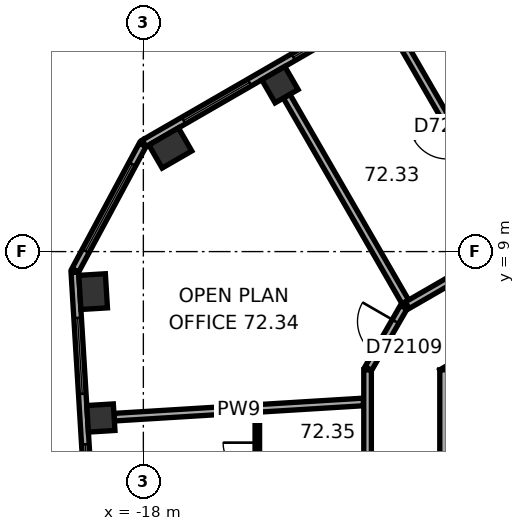
"""IFC4 building model, lengths in metres.
Left out: names, types, materials, properties, quantities, classifications, styles, units other than length and angle.
Written with IfcOpenShell. Run it as: python <this file> out.ifc"""

import sys

from ifc_helpers import new_model, si_unit, direction, frame, frame_2d, origin, origin_2d, place, context, subcontext, project, spatial, rectangle, extrude, element, fill, save


model = new_model("IFC4")
c1 = context("Model", 3, precision=1e-05, world=origin(), true_north=direction((0.0, 1.0)))
c2 = subcontext(c1, "Body", "Model", "MODEL_VIEW")
j1 = project(units=[si_unit("LENGTHUNIT", "METRE"), si_unit("PLANEANGLEUNIT", "RADIAN")], contexts=[c1])
p1 = place(None, origin())
s1 = spatial("IfcSite", under=j1, at=p1, CompositionType="ELEMENT")
p2 = place(p1, origin())
s2 = spatial("IfcBuilding", under=s1, at=p2, CompositionType="ELEMENT")
p3 = place(p2, frame((0.0, 0.0, 293.1)))
s3 = spatial("IfcBuildingStorey", under=s2, at=p3, CompositionType="ELEMENT", Elevation=293.1)
p4 = place(p3, frame((-14.406, 13.391, 0.0), z_axis=(0.0, 0.0, 1.0), x_axis=(-0.866025403784, -0.5, 0.0)))
e1 = element("IfcColumn", 1, at=p4, inside=s3, PredefinedType="COLUMN", context=c2, shape_type="SweptSolid", body=[
    extrude(rectangle(XDim=0.7, YDim=0.7, at=origin_2d()), origin(), (0.0, 0.0, 1.0), 3.7),
])
for number, where, z_axis, x_axis in (
    (2, (-17.291, 11.726, 0.0), (0.0, 0.0, 1.0), (-0.866, -0.5, 0.0)),
    (3, (-19.321, 7.947, 0.0), (0.0, 0.0, 1.0), (0.061, -0.998, 0.0)),
):
    element("IfcColumn", number, at=place(p3, frame(where, z_axis=z_axis, x_axis=x_axis)), inside=s3, PredefinedType="COLUMN", context=c2, shape_type="SweptSolid", body=[
        extrude(rectangle(XDim=0.9, YDim=0.7, at=origin_2d()), origin(), (0.0, 0.0, 1.0), 3.7),
    ])
p5 = place(p3, frame((-19.118, 4.621, 0.0), z_axis=(0.0, 0.0, 1.0), x_axis=(0.061048539535, -0.998134798422, 0.0)))
e4 = element("IfcColumn", 4, at=p5, inside=s3, PredefinedType="COLUMN", context=c2, shape_type="SweptSolid", body=[
    extrude(rectangle(XDim=0.7, YDim=0.7, at=origin_2d()), origin(), (0.0, 0.0, 1.0), 3.7),
])
p6 = place(p3, frame((0.175, 11.475, 0.0), z_axis=(0.0, 0.0, 1.0), x_axis=(-0.866026453023, -0.499998182661, 0.0)))
e5 = element("IfcWall", 5, at=p6, inside=s3, PredefinedType="SHEAR", context=c2, shape_type="SweptSolid", body=[
    extrude(rectangle(XDim=11.778, YDim=0.7, at=frame_2d((5.889, 0.0))), origin(), (0.0, 0.0, 1.0), 3.7),
])
p7 = place(p6, frame((6.089, 0.0, 0.0)))
e6 = element("IfcOpeningElement", 6, at=p7, cuts=e5, PredefinedType="OPENING", context=c2, shape_type="SweptSolid", body=[
    extrude(rectangle(XDim=1.5, YDim=2.1, at=frame_2d((0.75, 1.05))), frame((0.0, 0.36, 0.0), z_axis=(0.0, -1.0, 0.0), x_axis=(1.0, 0.0, 0.0)), (0.0, 0.0, 1.0), 0.72),
])
p8 = place(p6, frame((2.939, 0.0, 0.0)))
e7 = element("IfcOpeningElement", 7, at=p8, cuts=e5, PredefinedType="OPENING", context=c2, shape_type="SweptSolid", body=[
    extrude(rectangle(XDim=0.9, YDim=2.1, at=frame_2d((0.45, 1.05))), frame((0.0, 0.36, 0.0), z_axis=(0.0, -1.0, 0.0), x_axis=(1.0, 0.0, 0.0)), (0.0, 0.0, 1.0), 0.72),
])
p9 = place(p3, frame((-9.85, 5.889, 0.0), z_axis=(0.0, 0.0, 1.0), x_axis=(0.0, -1.0, 0.0)))
e8 = element("IfcWall", 8, at=p9, inside=s3, PredefinedType="SHEAR", context=c2, shape_type="SweptSolid", body=[
    extrude(rectangle(XDim=11.778, YDim=0.7, at=frame_2d((5.889, 0.0))), origin(), (0.0, 0.0, 1.0), 3.7),
])
p10 = place(p9, frame((5.039, 0.0, 0.0)))
e9 = element("IfcOpeningElement", 9, at=p10, cuts=e8, PredefinedType="OPENING", context=c2, shape_type="SweptSolid", body=[
    extrude(rectangle(XDim=1.1, YDim=2.1, at=frame_2d((0.55, 1.05))), frame((0.0, 0.36, 0.0), z_axis=(0.0, -1.0, 0.0), x_axis=(1.0, 0.0, 0.0)), (0.0, 0.0, 1.0), 0.72),
])
p11 = place(p9, frame((7.639, 0.0, 0.0)))
e10 = element("IfcOpeningElement", 10, at=p11, cuts=e8, PredefinedType="OPENING", context=c2, shape_type="SweptSolid", body=[
    extrude(rectangle(XDim=1.1, YDim=2.1, at=frame_2d((0.55, 1.05))), frame((0.0, 0.36, 0.0), z_axis=(0.0, -1.0, 0.0), x_axis=(1.0, 0.0, 0.0)), (0.0, 0.0, 1.0), 0.72),
])
p12 = place(p3, frame((-2.624, 20.713, 0.0), z_axis=(0.0, 0.0, 1.0), x_axis=(-0.866026460444, -0.499998169808, 0.0)))
e11 = element("IfcWall", 11, at=p12, inside=s3, PredefinedType="STANDARD", context=c2, shape_type="SweptSolid", body=[
    extrude(rectangle(XDim=17.731, YDim=0.2, at=frame_2d((8.866, 0.0))), origin(), (0.0, 0.0, 1.0), 3.7),
])
p13 = place(p12, frame((1.203, 0.0, 0.9)))
e12 = element("IfcOpeningElement", 12, at=p13, cuts=e11, PredefinedType="OPENING", context=c2, shape_type="SweptSolid", body=[
    extrude(rectangle(XDim=2.0, YDim=2.0, at=frame_2d((1.0, 1.0))), frame((0.0, 0.11, 0.0), z_axis=(0.0, -1.0, 0.0), x_axis=(1.0, 0.0, 0.0)), (0.0, 0.0, 1.0), 0.22),
])
p14 = place(p12, frame((4.535, 0.0, 0.9)))
e13 = element("IfcOpeningElement", 13, at=p14, cuts=e11, PredefinedType="OPENING", context=c2, shape_type="SweptSolid", body=[
    extrude(rectangle(XDim=2.0, YDim=2.0, at=frame_2d((1.0, 1.0))), frame((0.0, 0.11, 0.0), z_axis=(0.0, -1.0, 0.0), x_axis=(1.0, 0.0, 0.0)), (0.0, 0.0, 1.0), 0.22),
])
p15 = place(p12, frame((7.867, 0.0, 0.9)))
e14 = element("IfcOpeningElement", 14, at=p15, cuts=e11, PredefinedType="OPENING", context=c2, shape_type="SweptSolid", body=[
    extrude(rectangle(XDim=2.0, YDim=2.0, at=frame_2d((1.0, 1.0))), frame((0.0, 0.11, 0.0), z_axis=(0.0, -1.0, 0.0), x_axis=(1.0, 0.0, 0.0)), (0.0, 0.0, 1.0), 0.22),
])
p16 = place(p12, frame((11.198, 0.0, 0.9)))
e15 = element("IfcOpeningElement", 15, at=p16, cuts=e11, PredefinedType="OPENING", context=c2, shape_type="SweptSolid", body=[
    extrude(rectangle(XDim=2.0, YDim=2.0, at=frame_2d((1.0, 1.0))), frame((0.0, 0.11, 0.0), z_axis=(0.0, -1.0, 0.0), x_axis=(1.0, 0.0, 0.0)), (0.0, 0.0, 1.0), 0.22),
])
p17 = place(p12, frame((14.53, 0.0, 0.9)))
e16 = element("IfcOpeningElement", 16, at=p17, cuts=e11, PredefinedType="OPENING", context=c2, shape_type="SweptSolid", body=[
    extrude(rectangle(XDim=2.0, YDim=2.0, at=frame_2d((1.0, 1.0))), frame((0.0, 0.11, 0.0), z_axis=(0.0, -1.0, 0.0), x_axis=(1.0, 0.0, 0.0)), (0.0, 0.0, 1.0), 0.22),
])
p18 = place(p3, frame((-18.018, 11.808, 0.0), z_axis=(0.0, 0.0, 1.0), x_axis=(-0.473318619185, -0.880891301315, 0.0)))
e17 = element("IfcWall", 17, at=p18, inside=s3, PredefinedType="STANDARD", context=c2, shape_type="SweptSolid", body=[
    extrude(rectangle(XDim=3.747, YDim=0.2, at=frame_2d((1.874, 0.0))), origin(), (0.0, 0.0, 1.0), 3.7),
])
p19 = place(p18, frame((0.573, 0.0, 0.9)))
e18 = element("IfcOpeningElement", 18, at=p19, cuts=e17, PredefinedType="OPENING", context=c2, shape_type="SweptSolid", body=[
    extrude(rectangle(XDim=2.6, YDim=2.0, at=frame_2d((1.3, 1.0))), frame((0.0, 0.11, 0.0), z_axis=(0.0, -1.0, 0.0), x_axis=(1.0, 0.0, 0.0)), (0.0, 0.0, 1.0), 0.22),
])
p20 = place(p3, frame((-19.803, 8.454, 0.0), z_axis=(0.0, 0.0, 1.0), x_axis=(0.061036717565, -0.998135521414, 0.0)))
e19 = element("IfcWall", 19, at=p20, inside=s3, PredefinedType="STANDARD", context=c2, shape_type="SweptSolid", body=[
    extrude(rectangle(XDim=17.731, YDim=0.2, at=frame_2d((8.866, 0.0))), origin(), (0.0, 0.0, 1.0), 3.7),
])
p21 = place(p20, frame((1.202, 0.0, 0.9)))
e20 = element("IfcOpeningElement", 20, at=p21, cuts=e19, PredefinedType="OPENING", context=c2, shape_type="SweptSolid", body=[
    extrude(rectangle(XDim=2.0, YDim=2.0, at=frame_2d((1.0, 1.0))), frame((0.0, 0.11, 0.0), z_axis=(0.0, -1.0, 0.0), x_axis=(1.0, 0.0, 0.0)), (0.0, 0.0, 1.0), 0.22),
])
p22 = place(p20, frame((4.533, 0.0, 0.9)))
e21 = element("IfcOpeningElement", 21, at=p22, cuts=e19, PredefinedType="OPENING", context=c2, shape_type="SweptSolid", body=[
    extrude(rectangle(XDim=2.0, YDim=2.0, at=frame_2d((1.0, 1.0))), frame((0.0, 0.11, 0.0), z_axis=(0.0, -1.0, 0.0), x_axis=(1.0, 0.0, 0.0)), (0.0, 0.0, 1.0), 0.22),
])
p23 = place(p20, frame((7.865, 0.0, 0.9)))
e22 = element("IfcOpeningElement", 22, at=p23, cuts=e19, PredefinedType="OPENING", context=c2, shape_type="SweptSolid", body=[
    extrude(rectangle(XDim=2.0, YDim=2.0, at=frame_2d((1.0, 1.0))), frame((0.0, 0.11, 0.0), z_axis=(0.0, -1.0, 0.0), x_axis=(1.0, 0.0, 0.0)), (0.0, 0.0, 1.0), 0.22),
])
p24 = place(p20, frame((11.197, 0.0, 0.9)))
e23 = element("IfcOpeningElement", 23, at=p24, cuts=e19, PredefinedType="OPENING", context=c2, shape_type="SweptSolid", body=[
    extrude(rectangle(XDim=2.0, YDim=2.0, at=frame_2d((1.0, 1.0))), frame((0.0, 0.11, 0.0), z_axis=(0.0, -1.0, 0.0), x_axis=(1.0, 0.0, 0.0)), (0.0, 0.0, 1.0), 0.22),
])
p25 = place(p20, frame((14.528, 0.0, 0.9)))
e24 = element("IfcOpeningElement", 24, at=p25, cuts=e19, PredefinedType="OPENING", context=c2, shape_type="SweptSolid", body=[
    extrude(rectangle(XDim=2.0, YDim=2.0, at=frame_2d((1.0, 1.0))), frame((0.0, 0.11, 0.0), z_axis=(0.0, -1.0, 0.0), x_axis=(1.0, 0.0, 0.0)), (0.0, 0.0, 1.0), 0.22),
])
p26 = place(p3, frame((-18.768, 4.643, 0.0), z_axis=(0.0, 0.0, 1.0), x_axis=(0.99813496285, 0.0610458511, 0.0)))
e25 = element("IfcWall", 25, at=p26, inside=s3, PredefinedType="PARTITIONING", context=c2, shape_type="SweptSolid", body=[
    extrude(rectangle(XDim=6.571, YDim=0.2, at=frame_2d((3.285, 0.0))), origin(), (0.0, 0.0, 1.0), 3.42),
])
p27 = place(p3, frame((-15.001, 4.773, 0.0), z_axis=(0.0, 0.0, 1.0), x_axis=(0.0, -1.0, 0.0)))
e26 = element("IfcWall", 26, at=p27, inside=s3, PredefinedType="PARTITIONING", context=c2, shape_type="SweptSolid", body=[
    extrude(rectangle(XDim=6.476, YDim=0.12, at=frame_2d((3.238, 0.0))), origin(), (0.0, 0.0, 1.0), 3.42),
])
p28 = place(p27, frame((5.011, 0.0, 0.0)))
e27 = element("IfcOpeningElement", 27, at=p28, cuts=e26, PredefinedType="OPENING", context=c2, shape_type="SweptSolid", body=[
    extrude(rectangle(XDim=1.0, YDim=2.1, at=frame_2d((0.5, 1.05))), frame((0.0, 0.07, 0.0), z_axis=(0.0, -1.0, 0.0), x_axis=(1.0, 0.0, 0.0)), (0.0, 0.0, 1.0), 0.14),
])
p29 = place(p27, frame((0.8, 0.0, 0.0)))
e28 = element("IfcOpeningElement", 28, at=p29, cuts=e26, PredefinedType="OPENING", context=c2, shape_type="SweptSolid", body=[
    extrude(rectangle(XDim=0.9, YDim=2.1, at=frame_2d((0.45, 1.05))), frame((0.0, 0.07, 0.0), z_axis=(0.0, -1.0, 0.0), x_axis=(1.0, 0.0, 0.0)), (0.0, 0.0, 1.0), 0.14),
])
p30 = place(p27, frame((3.073, 0.0, 0.0)))
e29 = element("IfcOpeningElement", 29, at=p30, cuts=e26, PredefinedType="OPENING", context=c2, shape_type="SweptSolid", body=[
    extrude(rectangle(XDim=0.9, YDim=2.1, at=frame_2d((0.45, 1.05))), frame((0.0, 0.07, 0.0), z_axis=(0.0, -1.0, 0.0), x_axis=(1.0, 0.0, 0.0)), (0.0, 0.0, 1.0), 0.14),
])
p31 = place(p3, frame((-14.23, 13.088, 0.0), z_axis=(0.0, 0.0, 1.0), x_axis=(0.500004234368, -0.866022959057, 0.0)))
e30 = element("IfcWall", 30, at=p31, inside=s3, PredefinedType="PARTITIONING", context=c2, shape_type="SweptSolid", body=[
    extrude(rectangle(XDim=6.25, YDim=0.2, at=frame_2d((3.125, 0.0))), origin(), (0.0, 0.0, 1.0), 3.42),
])
p32 = place(p3, frame((-12.1, 5.889, 0.0), z_axis=(0.0, 0.0, 1.0), x_axis=(0.0, -1.0, 0.0)))
e31 = element("IfcWall", 31, at=p32, inside=s3, PredefinedType="PARTITIONING", context=c2, shape_type="SweptSolid", body=[
    extrude(rectangle(XDim=3.688, YDim=0.2, at=frame_2d((1.844, 0.0))), origin(), (0.0, 0.0, 1.0), 3.42),
])
p33 = place(p3, frame((-11.345, 14.754, 0.0), z_axis=(0.0, 0.0, 1.0), x_axis=(0.500005339912, -0.866022320763, 0.0)))
e32 = element("IfcWall", 32, at=p33, inside=s3, PredefinedType="PARTITIONING", context=c2, shape_type="SweptSolid", body=[
    extrude(rectangle(XDim=6.35, YDim=0.2, at=frame_2d((3.175, 0.0))), origin(), (0.0, 0.0, 1.0), 3.42),
])
p34 = place(p33, frame((2.675, 0.0, 0.0)))
e33 = element("IfcOpeningElement", 33, at=p34, cuts=e32, PredefinedType="OPENING", context=c2, shape_type="SweptSolid", body=[
    extrude(rectangle(XDim=1.0, YDim=2.1, at=frame_2d((0.5, 1.05))), frame((0.0, 0.11, 0.0), z_axis=(0.0, -1.0, 0.0), x_axis=(1.0, 0.0, 0.0)), (0.0, 0.0, 1.0), 0.22),
])
p35 = place(p3, frame((-11.15, 7.534, 0.0), z_axis=(0.0, 0.0, 1.0), x_axis=(-0.500063286585, -0.865988862174, 0.0)))
e34 = element("IfcWall", 34, at=p35, inside=s3, PredefinedType="PARTITIONING", context=c2, shape_type="SweptSolid", body=[
    extrude(rectangle(XDim=1.86, YDim=0.2, at=frame_2d((0.93, 0.0))), origin(), (0.0, 0.0, 1.0), 3.42),
])
p36 = place(p35, frame((0.43, 0.0, 0.0)))
e35 = element("IfcOpeningElement", 35, at=p36, cuts=e34, PredefinedType="OPENING", context=c2, shape_type="SweptSolid", body=[
    extrude(rectangle(XDim=1.0, YDim=2.1, at=frame_2d((0.5, 1.05))), frame((0.0, 0.11, 0.0), z_axis=(0.0, -1.0, 0.0), x_axis=(1.0, 0.0, 0.0)), (0.0, 0.0, 1.0), 0.22),
])
p37 = place(p3, frame((-8.257, 9.205, 0.0), z_axis=(0.0, 0.0, 1.0), x_axis=(-0.866030838723, -0.499990586292, 0.0)))
e36 = element("IfcWall", 36, at=p37, inside=s3, PredefinedType="PARTITIONING", context=c2, shape_type="SweptSolid", body=[
    extrude(rectangle(XDim=3.231, YDim=0.2, at=frame_2d((1.616, 0.0))), origin(), (0.0, 0.0, 1.0), 3.42),
])
p38 = place(p16, origin())
e37 = element("IfcWindow", 37, at=p38, inside=s3, PartitioningType="SINGLE_PANEL", PredefinedType="WINDOW", context=c2, shape_type="SweptSolid", body=[
    extrude(rectangle(XDim=2.0, YDim=2.0, at=frame_2d((1.0, 1.0))), frame((0.0, 0.03, 0.0), z_axis=(0.0, -1.0, 0.0), x_axis=(1.0, 0.0, 0.0)), (0.0, 0.0, 1.0), 0.06),
])
fill(e15, e37)
p39 = place(p17, origin())
e38 = element("IfcWindow", 38, at=p39, inside=s3, PartitioningType="SINGLE_PANEL", PredefinedType="WINDOW", context=c2, shape_type="SweptSolid", body=[
    extrude(rectangle(XDim=2.0, YDim=2.0, at=frame_2d((1.0, 1.0))), frame((0.0, 0.03, 0.0), z_axis=(0.0, -1.0, 0.0), x_axis=(1.0, 0.0, 0.0)), (0.0, 0.0, 1.0), 0.06),
])
fill(e16, e38)
p40 = place(p19, origin())
e39 = element("IfcWindow", 39, at=p40, inside=s3, PartitioningType="SINGLE_PANEL", PredefinedType="WINDOW", context=c2, shape_type="SweptSolid", body=[
    extrude(rectangle(XDim=2.6, YDim=2.0, at=frame_2d((1.3, 1.0))), frame((0.0, 0.03, 0.0), z_axis=(0.0, -1.0, 0.0), x_axis=(1.0, 0.0, 0.0)), (0.0, 0.0, 1.0), 0.06),
])
fill(e18, e39)
p41 = place(p21, origin())
e40 = element("IfcWindow", 40, at=p41, inside=s3, PartitioningType="SINGLE_PANEL", PredefinedType="WINDOW", context=c2, shape_type="SweptSolid", body=[
    extrude(rectangle(XDim=2.0, YDim=2.0, at=frame_2d((1.0, 1.0))), frame((0.0, 0.03, 0.0), z_axis=(0.0, -1.0, 0.0), x_axis=(1.0, 0.0, 0.0)), (0.0, 0.0, 1.0), 0.06),
])
fill(e20, e40)
p42 = place(p22, origin())
e41 = element("IfcWindow", 41, at=p42, inside=s3, PartitioningType="SINGLE_PANEL", PredefinedType="WINDOW", context=c2, shape_type="SweptSolid", body=[
    extrude(rectangle(XDim=2.0, YDim=2.0, at=frame_2d((1.0, 1.0))), frame((0.0, 0.03, 0.0), z_axis=(0.0, -1.0, 0.0), x_axis=(1.0, 0.0, 0.0)), (0.0, 0.0, 1.0), 0.06),
])
fill(e21, e41)
p43 = place(p36, origin())
e42 = element("IfcDoor", 42, at=p43, inside=s3, OperationType="SINGLE_SWING_LEFT", PredefinedType="DOOR", context=c2, shape_type="SweptSolid", body=[
    extrude(rectangle(XDim=1.0, YDim=2.1, at=frame_2d((0.5, 1.05))), frame((0.0, 0.025, 0.0), z_axis=(0.0, -1.0, 0.0), x_axis=(1.0, 0.0, 0.0)), (0.0, 0.0, 1.0), 0.05),
])
fill(e35, e42)
p44 = place(p29, origin())
e43 = element("IfcDoor", 43, at=p44, inside=s3, OperationType="SINGLE_SWING_LEFT", PredefinedType="DOOR", context=c2, shape_type="SweptSolid", body=[
    extrude(rectangle(XDim=0.9, YDim=2.1, at=frame_2d((0.45, 1.05))), frame((0.0, 0.025, 0.0), z_axis=(0.0, -1.0, 0.0), x_axis=(1.0, 0.0, 0.0)), (0.0, 0.0, 1.0), 0.05),
])
fill(e28, e43)
save(model, sys.argv[1])
